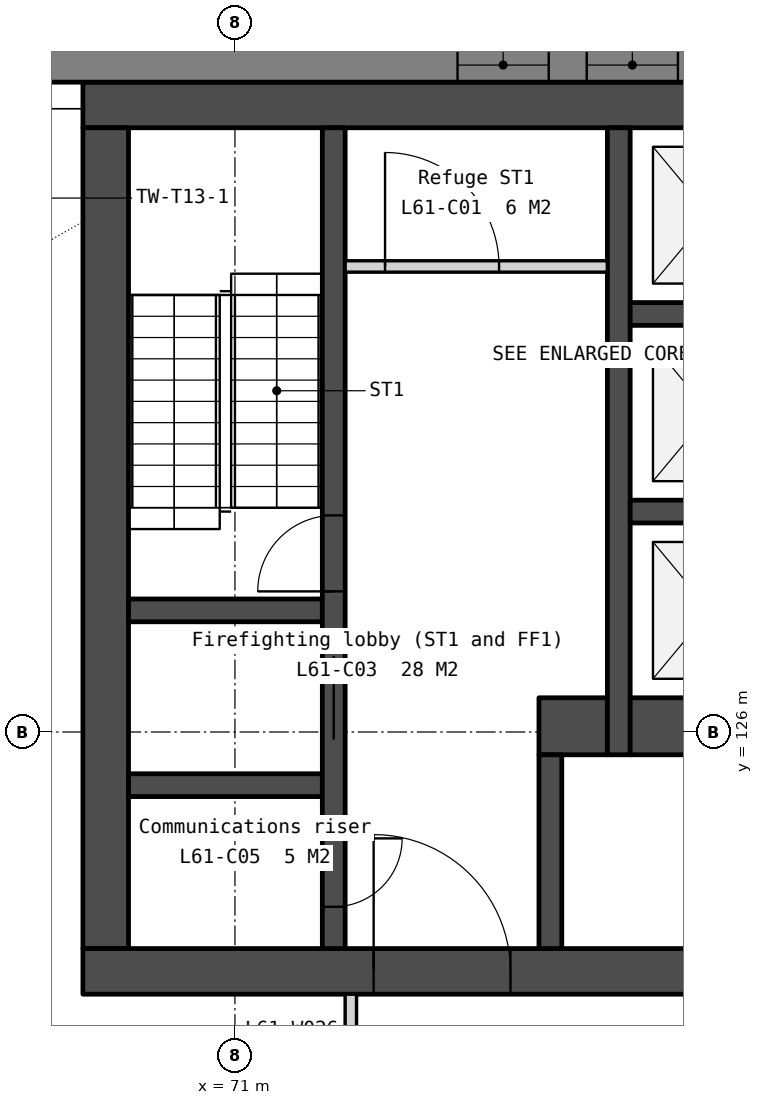
"""IFC4 building model, lengths in metres.
Left out: names, types, materials, properties, quantities, classifications, styles, units other than length and angle.
Written with IfcOpenShell. Run it as: python <this file> out.ifc"""

import sys

from ifc_helpers import new_model, si_unit, direction, frame, frame_2d, origin, place, context, subcontext, project, spatial, polyline, rectangle, outline, extrude, element, fill, save


model = new_model("IFC4")
c1 = context("Model", 3, precision=1e-05, world=origin(), true_north=direction((0.0, 1.0)))
c2 = subcontext(c1, "Body", "Model", "MODEL_VIEW")
j1 = project(units=[si_unit("LENGTHUNIT", "METRE"), si_unit("PLANEANGLEUNIT", "RADIAN")], contexts=[c1])
p1 = place(None, origin())
s1 = spatial("IfcSite", under=j1, at=p1, CompositionType="ELEMENT")
p2 = place(p1, origin())
s2 = spatial("IfcBuilding", under=s1, at=p2, CompositionType="ELEMENT")
p3 = place(p2, frame((0.0, 0.0, 250.4)))
s3 = spatial("IfcBuildingStorey", under=s2, at=p3, CompositionType="ELEMENT", Elevation=250.4)
p4 = place(p3, frame((69.0, 134.25, 0.0), z_axis=(0.0, 0.0, 1.0), x_axis=(1.0, 0.0, 0.0)))
e1 = element("IfcWall", 1, at=p4, inside=s3, PredefinedType="SOLIDWALL", context=c2, shape_type="SweptSolid", body=[
    extrude(rectangle(XDim=22.0, YDim=0.6, at=frame_2d((11.0, 0.0))), origin(), (0.0, 0.0, 1.0), 3.75),
])
p5 = place(p3, frame((69.3, 133.95, 0.0), z_axis=(0.0, 0.0, 1.0), x_axis=(0.0, -1.0, 0.0)))
e2 = element("IfcWall", 2, at=p5, inside=s3, PredefinedType="SOLIDWALL", context=c2, shape_type="SweptSolid", body=[
    extrude(rectangle(XDim=10.8, YDim=0.6, at=frame_2d((5.4, 0.0))), origin(), (0.0, 0.0, 1.0), 3.75),
])
p6 = place(p3, frame((69.0, 122.85, 0.0), z_axis=(0.0, 0.0, 1.0), x_axis=(1.0, 0.0, 0.0)))
e3 = element("IfcWall", 3, at=p6, inside=s3, PredefinedType="SOLIDWALL", context=c2, shape_type="SweptSolid", body=[
    extrude(rectangle(XDim=22.0, YDim=0.6, at=frame_2d((11.0, 0.0))), origin(), (0.0, 0.0, 1.0), 3.75),
])
p7 = place(p6, frame((16.375, 0.0, 0.0)))
e4 = element("IfcOpeningElement", 4, at=p7, cuts=e3, PredefinedType="OPENING", context=c2, shape_type="SweptSolid", body=[
    extrude(rectangle(XDim=1.8, YDim=2.1, at=frame_2d((0.9, 1.05))), frame((0.0, 0.31, 0.0), z_axis=(0.0, -1.0, 0.0), x_axis=(1.0, 0.0, 0.0)), (0.0, 0.0, 1.0), 0.62),
])
p8 = place(p6, frame((3.825, 0.0, 0.0)))
e5 = element("IfcOpeningElement", 5, at=p8, cuts=e3, PredefinedType="OPENING", context=c2, shape_type="SweptSolid", body=[
    extrude(rectangle(XDim=1.8, YDim=2.1, at=frame_2d((0.9, 1.05))), frame((0.0, 0.31, 0.0), z_axis=(0.0, -1.0, 0.0), x_axis=(1.0, 0.0, 0.0)), (0.0, 0.0, 1.0), 0.62),
])
p9 = place(p6, frame((12.85, 0.0, 0.0)))
e6 = element("IfcOpeningElement", 6, at=p9, cuts=e3, PredefinedType="OPENING", context=c2, shape_type="SweptSolid", body=[
    extrude(rectangle(XDim=1.5, YDim=2.1, at=frame_2d((0.75, 1.05))), frame((0.0, 0.31, 0.0), z_axis=(0.0, -1.0, 0.0), x_axis=(1.0, 0.0, 0.0)), (0.0, 0.0, 1.0), 0.62),
])
for number, where, z_axis, x_axis in (
    (7, (69.6, 127.6, 0.0), (0.0, 0.0, 1.0), (1.0, 0.0, 0.0)),
    (8, (69.6, 125.3, 0.0), (0.0, 0.0, 1.0), (1.0, 0.0, 0.0)),
):
    element("IfcWall", number, at=place(p3, frame(where, z_axis=z_axis, x_axis=x_axis)), inside=s3, PredefinedType="SOLIDWALL", context=c2, shape_type="SweptSolid", body=[
        extrude(rectangle(XDim=2.55, YDim=0.3, at=frame_2d((1.275, 0.0))), origin(), (0.0, 0.0, 1.0), 3.75),
    ])
p10 = place(p3, frame((72.3, 133.95, 0.0), z_axis=(0.0, 0.0, 1.0), x_axis=(0.0, -1.0, 0.0)))
e9 = element("IfcWall", 9, at=p10, inside=s3, PredefinedType="SOLIDWALL", context=c2, shape_type="SweptSolid", body=[
    extrude(rectangle(XDim=10.8, YDim=0.3, at=frame_2d((5.4, 0.0))), origin(), (0.0, 0.0, 1.0), 3.75),
])
p11 = place(p10, frame((6.95, 0.0, 0.0)))
e10 = element("IfcOpeningElement", 10, at=p11, cuts=e9, PredefinedType="OPENING", context=c2, shape_type="SweptSolid", body=[
    extrude(rectangle(XDim=1.1, YDim=2.1, at=frame_2d((0.55, 1.05))), frame((0.0, 0.16, 0.0), z_axis=(0.0, -1.0, 0.0), x_axis=(1.0, 0.0, 0.0)), (0.0, 0.0, 1.0), 0.32),
])
p12 = place(p10, frame((9.35, 0.0, 0.0)))
e11 = element("IfcOpeningElement", 11, at=p12, cuts=e9, PredefinedType="OPENING", context=c2, shape_type="SweptSolid", body=[
    extrude(rectangle(XDim=0.9, YDim=2.1, at=frame_2d((0.45, 1.05))), frame((0.0, 0.16, 0.0), z_axis=(0.0, -1.0, 0.0), x_axis=(1.0, 0.0, 0.0)), (0.0, 0.0, 1.0), 0.32),
])
p13 = place(p10, frame((5.1, 0.0, 0.0)))
e12 = element("IfcOpeningElement", 12, at=p13, cuts=e9, PredefinedType="OPENING", context=c2, shape_type="SweptSolid", body=[
    extrude(rectangle(XDim=1.0, YDim=2.1, at=frame_2d((0.5, 1.05))), frame((0.0, 0.16, 0.0), z_axis=(0.0, -1.0, 0.0), x_axis=(1.0, 0.0, 0.0)), (0.0, 0.0, 1.0), 0.32),
])
p14 = place(p3, frame((72.45, 132.125, 0.0), z_axis=(0.0, 0.0, 1.0), x_axis=(1.0, 0.0, 0.0)))
e13 = element("IfcWall", 13, at=p14, inside=s3, PredefinedType="PARTITIONING", context=c2, shape_type="SweptSolid", body=[
    extrude(rectangle(XDim=3.45, YDim=0.15, at=frame_2d((1.725, 0.0))), origin(), (0.0, 0.0, 1.0), 3.75),
])
p15 = place(p14, frame((0.525, 0.0, 0.0)))
e14 = element("IfcOpeningElement", 14, at=p15, cuts=e13, PredefinedType="OPENING", context=c2, shape_type="SweptSolid", body=[
    extrude(rectangle(XDim=1.5, YDim=2.1, at=frame_2d((0.75, 1.05))), frame((0.0, 0.085, 0.0), z_axis=(0.0, -1.0, 0.0), x_axis=(1.0, 0.0, 0.0)), (0.0, 0.0, 1.0), 0.17),
])
p16 = place(p3, frame((75.0, 126.075, 0.0), z_axis=(0.0, 0.0, 1.0), x_axis=(1.0, 0.0, 0.0)))
e15 = element("IfcWall", 15, at=p16, inside=s3, PredefinedType="SOLIDWALL", context=c2, shape_type="SweptSolid", body=[
    extrude(rectangle(XDim=0.9, YDim=0.75, at=frame_2d((0.45, 0.0))), origin(), (0.0, 0.0, 1.0), 3.75),
])
p17 = place(p3, frame((75.15, 125.7, 0.0), z_axis=(0.0, 0.0, 1.0), x_axis=(0.0, -1.0, 0.0)))
e16 = element("IfcWall", 16, at=p17, inside=s3, PredefinedType="SOLIDWALL", context=c2, shape_type="SweptSolid", body=[
    extrude(rectangle(XDim=2.55, YDim=0.3, at=frame_2d((1.275, 0.0))), origin(), (0.0, 0.0, 1.0), 3.75),
])
p18 = place(p3, frame((76.05, 133.95, 0.0), z_axis=(0.0, 0.0, 1.0), x_axis=(0.0, -1.0, 0.0)))
e17 = element("IfcWall", 17, at=p18, inside=s3, PredefinedType="SOLIDWALL", context=c2, shape_type="SweptSolid", body=[
    extrude(rectangle(XDim=8.25, YDim=0.3, at=frame_2d((4.125, 0.0))), origin(), (0.0, 0.0, 1.0), 3.75),
])
for number, where, z_axis, x_axis in (
    (18, (76.2, 131.5, 0.0), (0.0, 0.0, 1.0), (1.0, 0.0, 0.0)),
    (19, (76.2, 128.9, 0.0), (0.0, 0.0, 1.0), (1.0, 0.0, 0.0)),
):
    element("IfcWall", number, at=place(p3, frame(where, z_axis=z_axis, x_axis=x_axis)), inside=s3, PredefinedType="SOLIDWALL", context=c2, shape_type="SweptSolid", body=[
        extrude(rectangle(XDim=2.1, YDim=0.3, at=frame_2d((1.05, 0.0))), origin(), (0.0, 0.0, 1.0), 3.75),
    ])
p19 = place(p3, frame((76.2, 126.075, 0.0), z_axis=(0.0, 0.0, 1.0), x_axis=(1.0, 0.0, 0.0)))
e20 = element("IfcWall", 20, at=p19, inside=s3, PredefinedType="SOLIDWALL", context=c2, shape_type="SweptSolid", body=[
    extrude(rectangle(XDim=2.1, YDim=0.75, at=frame_2d((1.05, 0.0))), origin(), (0.0, 0.0, 1.0), 3.75),
])
p20 = place(p3, frame((98.486, 134.775, -0.15), z_axis=(0.0, 0.0, 1.0), x_axis=(-1.0, 0.0, 0.0)))
e21 = element("IfcWall", 21, at=p20, inside=s3, PredefinedType="SOLIDWALL", context=c2, shape_type="SweptSolid", body=[
    extrude(outline(polyline([(0.0, 0.0), (0.0, 3.9), (30.551, 3.9), (30.551, 0.0), (0.0, 0.0)])), frame((0.0, 0.225, 0.0), z_axis=(0.0, -1.0, 0.0), x_axis=(1.0, 0.0, 0.0)), (0.0, 0.0, 1.0), 0.45),
])
p21 = place(p20, frame((3.172, 0.0, 0.95)))
e22 = element("IfcOpeningElement", 22, at=p21, cuts=e21, PredefinedType="OPENING", context=c2, shape_type="SweptSolid", body=[
    extrude(rectangle(XDim=1.2, YDim=2.2, at=frame_2d((0.6, 1.1))), frame((0.0, 0.235, 0.0), z_axis=(0.0, -1.0, 0.0), x_axis=(1.0, 0.0, 0.0)), (0.0, 0.0, 1.0), 0.47),
])
p22 = place(p20, frame((4.872, 0.0, 0.95)))
e23 = element("IfcOpeningElement", 23, at=p22, cuts=e21, PredefinedType="OPENING", context=c2, shape_type="SweptSolid", body=[
    extrude(rectangle(XDim=1.2, YDim=2.2, at=frame_2d((0.6, 1.1))), frame((0.0, 0.235, 0.0), z_axis=(0.0, -1.0, 0.0), x_axis=(1.0, 0.0, 0.0)), (0.0, 0.0, 1.0), 0.47),
])
p23 = place(p20, frame((12.415, 0.0, 0.95)))
e24 = element("IfcOpeningElement", 24, at=p23, cuts=e21, PredefinedType="OPENING", context=c2, shape_type="SweptSolid", body=[
    extrude(rectangle(XDim=1.2, YDim=2.2, at=frame_2d((0.6, 1.1))), frame((0.0, 0.235, 0.0), z_axis=(0.0, -1.0, 0.0), x_axis=(1.0, 0.0, 0.0)), (0.0, 0.0, 1.0), 0.47),
])
p24 = place(p20, frame((14.115, 0.0, 0.95)))
e25 = element("IfcOpeningElement", 25, at=p24, cuts=e21, PredefinedType="OPENING", context=c2, shape_type="SweptSolid", body=[
    extrude(rectangle(XDim=1.2, YDim=2.2, at=frame_2d((0.6, 1.1))), frame((0.0, 0.235, 0.0), z_axis=(0.0, -1.0, 0.0), x_axis=(1.0, 0.0, 0.0)), (0.0, 0.0, 1.0), 0.47),
])
p25 = place(p20, frame((21.658, 0.0, 0.95)))
e26 = element("IfcOpeningElement", 26, at=p25, cuts=e21, PredefinedType="OPENING", context=c2, shape_type="SweptSolid", body=[
    extrude(rectangle(XDim=1.2, YDim=2.2, at=frame_2d((0.6, 1.1))), frame((0.0, 0.235, 0.0), z_axis=(0.0, -1.0, 0.0), x_axis=(1.0, 0.0, 0.0)), (0.0, 0.0, 1.0), 0.47),
])
p26 = place(p20, frame((23.358, 0.0, 0.95)))
e27 = element("IfcOpeningElement", 27, at=p26, cuts=e21, PredefinedType="OPENING", context=c2, shape_type="SweptSolid", body=[
    extrude(rectangle(XDim=1.2, YDim=2.2, at=frame_2d((0.6, 1.1))), frame((0.0, 0.235, 0.0), z_axis=(0.0, -1.0, 0.0), x_axis=(1.0, 0.0, 0.0)), (0.0, 0.0, 1.0), 0.47),
])
p27 = place(p3, frame((60.609, 133.207, -0.15), z_axis=(0.0, 0.0, 1.0), x_axis=(0.500002536638, -0.866023939251, 0.0)))
e28 = element("IfcWall", 28, at=p27, inside=s3, PredefinedType="SOLIDWALL", context=c2, shape_type="SweptSolid", body=[
    extrude(outline(polyline([(36.972, 0.0), (36.972, 3.9), (0.0, 3.9), (0.0, 0.0), (36.972, 0.0)])), frame((0.0, 0.225, 0.0), z_axis=(0.0, -1.0, 0.0), x_axis=(1.0, 0.0, 0.0)), (0.0, 0.0, 1.0), 0.45),
])
p28 = place(p27, frame((3.172, 0.0, 0.95)))
e29 = element("IfcOpeningElement", 29, at=p28, cuts=e28, PredefinedType="OPENING", context=c2, shape_type="SweptSolid", body=[
    extrude(rectangle(XDim=1.2, YDim=2.2, at=frame_2d((0.6, 1.1))), frame((0.0, 0.235, 0.0), z_axis=(0.0, -1.0, 0.0), x_axis=(1.0, 0.0, 0.0)), (0.0, 0.0, 1.0), 0.47),
])
p29 = place(p27, frame((4.872, 0.0, 0.95)))
e30 = element("IfcOpeningElement", 30, at=p29, cuts=e28, PredefinedType="OPENING", context=c2, shape_type="SweptSolid", body=[
    extrude(rectangle(XDim=1.2, YDim=2.2, at=frame_2d((0.6, 1.1))), frame((0.0, 0.235, 0.0), z_axis=(0.0, -1.0, 0.0), x_axis=(1.0, 0.0, 0.0)), (0.0, 0.0, 1.0), 0.47),
])
p30 = place(p27, frame((12.415, 0.0, 0.95)))
e31 = element("IfcOpeningElement", 31, at=p30, cuts=e28, PredefinedType="OPENING", context=c2, shape_type="SweptSolid", body=[
    extrude(rectangle(XDim=1.2, YDim=2.2, at=frame_2d((0.6, 1.1))), frame((0.0, 0.235, 0.0), z_axis=(0.0, -1.0, 0.0), x_axis=(1.0, 0.0, 0.0)), (0.0, 0.0, 1.0), 0.47),
])
p31 = place(p27, frame((14.115, 0.0, 0.95)))
e32 = element("IfcOpeningElement", 32, at=p31, cuts=e28, PredefinedType="OPENING", context=c2, shape_type="SweptSolid", body=[
    extrude(rectangle(XDim=1.2, YDim=2.2, at=frame_2d((0.6, 1.1))), frame((0.0, 0.235, 0.0), z_axis=(0.0, -1.0, 0.0), x_axis=(1.0, 0.0, 0.0)), (0.0, 0.0, 1.0), 0.47),
])
p32 = place(p27, frame((21.658, 0.0, 0.95)))
e33 = element("IfcOpeningElement", 33, at=p32, cuts=e28, PredefinedType="OPENING", context=c2, shape_type="SweptSolid", body=[
    extrude(rectangle(XDim=1.2, YDim=2.2, at=frame_2d((0.6, 1.1))), frame((0.0, 0.235, 0.0), z_axis=(0.0, -1.0, 0.0), x_axis=(1.0, 0.0, 0.0)), (0.0, 0.0, 1.0), 0.47),
])
p33 = place(p27, frame((23.358, 0.0, 0.95)))
e34 = element("IfcOpeningElement", 34, at=p33, cuts=e28, PredefinedType="OPENING", context=c2, shape_type="SweptSolid", body=[
    extrude(rectangle(XDim=1.2, YDim=2.2, at=frame_2d((0.6, 1.1))), frame((0.0, 0.235, 0.0), z_axis=(0.0, -1.0, 0.0), x_axis=(1.0, 0.0, 0.0)), (0.0, 0.0, 1.0), 0.47),
])
p34 = place(p27, frame((30.901, 0.0, 0.95)))
e35 = element("IfcOpeningElement", 35, at=p34, cuts=e28, PredefinedType="OPENING", context=c2, shape_type="SweptSolid", body=[
    extrude(rectangle(XDim=1.2, YDim=2.2, at=frame_2d((0.6, 1.1))), frame((0.0, 0.235, 0.0), z_axis=(0.0, -1.0, 0.0), x_axis=(1.0, 0.0, 0.0)), (0.0, 0.0, 1.0), 0.47),
])
p35 = place(p27, frame((32.601, 0.0, 0.95)))
e36 = element("IfcOpeningElement", 36, at=p35, cuts=e28, PredefinedType="OPENING", context=c2, shape_type="SweptSolid", body=[
    extrude(rectangle(XDim=1.2, YDim=2.2, at=frame_2d((0.6, 1.1))), frame((0.0, 0.235, 0.0), z_axis=(0.0, -1.0, 0.0), x_axis=(1.0, 0.0, 0.0)), (0.0, 0.0, 1.0), 0.47),
])
p36 = place(p3, frame((72.525, 120.05, 0.0), z_axis=(0.0, 0.0, 1.0), x_axis=(0.0, 1.0, 0.0)))
e37 = element("IfcWall", 37, at=p36, inside=s3, PredefinedType="PARTITIONING", context=c2, shape_type="SweptSolid", body=[
    extrude(rectangle(XDim=2.5, YDim=0.15, at=frame_2d((1.25, 0.0))), origin(), (0.0, 0.0, 1.0), 3.75),
])
p37 = place(p36, frame((0.75, 0.0, 0.0)))
e38 = element("IfcOpeningElement", 38, at=p37, cuts=e37, PredefinedType="OPENING", context=c2, shape_type="SweptSolid", body=[
    extrude(rectangle(XDim=1.0, YDim=2.1, at=frame_2d((0.5, 1.05))), frame((0.0, 0.085, 0.0), z_axis=(0.0, -1.0, 0.0), x_axis=(1.0, 0.0, 0.0)), (0.0, 0.0, 1.0), 0.17),
])
p38 = place(p11, origin())
e39 = element("IfcDoor", 39, at=p38, inside=s3, OperationType="SLIDING_TO_LEFT", PredefinedType="DOOR", context=c2, shape_type="SweptSolid", body=[
    extrude(rectangle(XDim=1.1, YDim=2.1, at=frame_2d((0.55, 1.05))), frame((0.0, 0.025, 0.0), z_axis=(0.0, -1.0, 0.0), x_axis=(1.0, 0.0, 0.0)), (0.0, 0.0, 1.0), 0.05),
])
fill(e10, e39)
p39 = place(p8, origin())
e40 = element("IfcDoor", 40, at=p39, inside=s3, OperationType="DOUBLE_DOOR_DOUBLE_SWING", PredefinedType="DOOR", context=c2, shape_type="SweptSolid", body=[
    extrude(rectangle(XDim=1.8, YDim=2.1, at=frame_2d((0.9, 1.05))), frame((0.0, 0.025, 0.0), z_axis=(0.0, -1.0, 0.0), x_axis=(1.0, 0.0, 0.0)), (0.0, 0.0, 1.0), 0.05),
])
fill(e5, e40)
p40 = place(p15, origin())
e41 = element("IfcDoor", 41, at=p40, inside=s3, OperationType="DOUBLE_DOOR_DOUBLE_SWING", PredefinedType="DOOR", context=c2, shape_type="SweptSolid", body=[
    extrude(rectangle(XDim=1.5, YDim=2.1, at=frame_2d((0.75, 1.05))), frame((0.0, 0.025, 0.0), z_axis=(0.0, -1.0, 0.0), x_axis=(1.0, 0.0, 0.0)), (0.0, 0.0, 1.0), 0.05),
])
fill(e14, e41)
p41 = place(p12, origin())
e42 = element("IfcDoor", 42, at=p41, inside=s3, OperationType="SINGLE_SWING_LEFT", PredefinedType="DOOR", context=c2, shape_type="SweptSolid", body=[
    extrude(rectangle(XDim=0.9, YDim=2.1, at=frame_2d((0.45, 1.05))), frame((0.0, 0.025, 0.0), z_axis=(0.0, -1.0, 0.0), x_axis=(1.0, 0.0, 0.0)), (0.0, 0.0, 1.0), 0.05),
])
fill(e11, e42)
p42 = place(p13, origin())
e43 = element("IfcDoor", 43, at=p42, inside=s3, OperationType="SINGLE_SWING_RIGHT", PredefinedType="DOOR", context=c2, shape_type="SweptSolid", body=[
    extrude(rectangle(XDim=1.0, YDim=2.1, at=frame_2d((0.5, 1.05))), frame((0.0, 0.025, 0.0), z_axis=(0.0, -1.0, 0.0), x_axis=(1.0, 0.0, 0.0)), (0.0, 0.0, 1.0), 0.05),
])
fill(e12, e43)
p43 = place(p25, origin())
e44 = element("IfcWindow", 44, at=p43, inside=s3, PartitioningType="SINGLE_PANEL", PredefinedType="WINDOW", context=c2, shape_type="SweptSolid", body=[
    extrude(rectangle(XDim=1.2, YDim=2.2, at=frame_2d((0.6, 1.1))), frame((0.0, 0.03, 0.0), z_axis=(0.0, -1.0, 0.0), x_axis=(1.0, 0.0, 0.0)), (0.0, 0.0, 1.0), 0.06),
])
fill(e26, e44)
p44 = place(p26, origin())
e45 = element("IfcWindow", 45, at=p44, inside=s3, PartitioningType="SINGLE_PANEL", PredefinedType="WINDOW", context=c2, shape_type="SweptSolid", body=[
    extrude(rectangle(XDim=1.2, YDim=2.2, at=frame_2d((0.6, 1.1))), frame((0.0, 0.03, 0.0), z_axis=(0.0, -1.0, 0.0), x_axis=(1.0, 0.0, 0.0)), (0.0, 0.0, 1.0), 0.06),
])
fill(e27, e45)
save(model, sys.argv[1])
